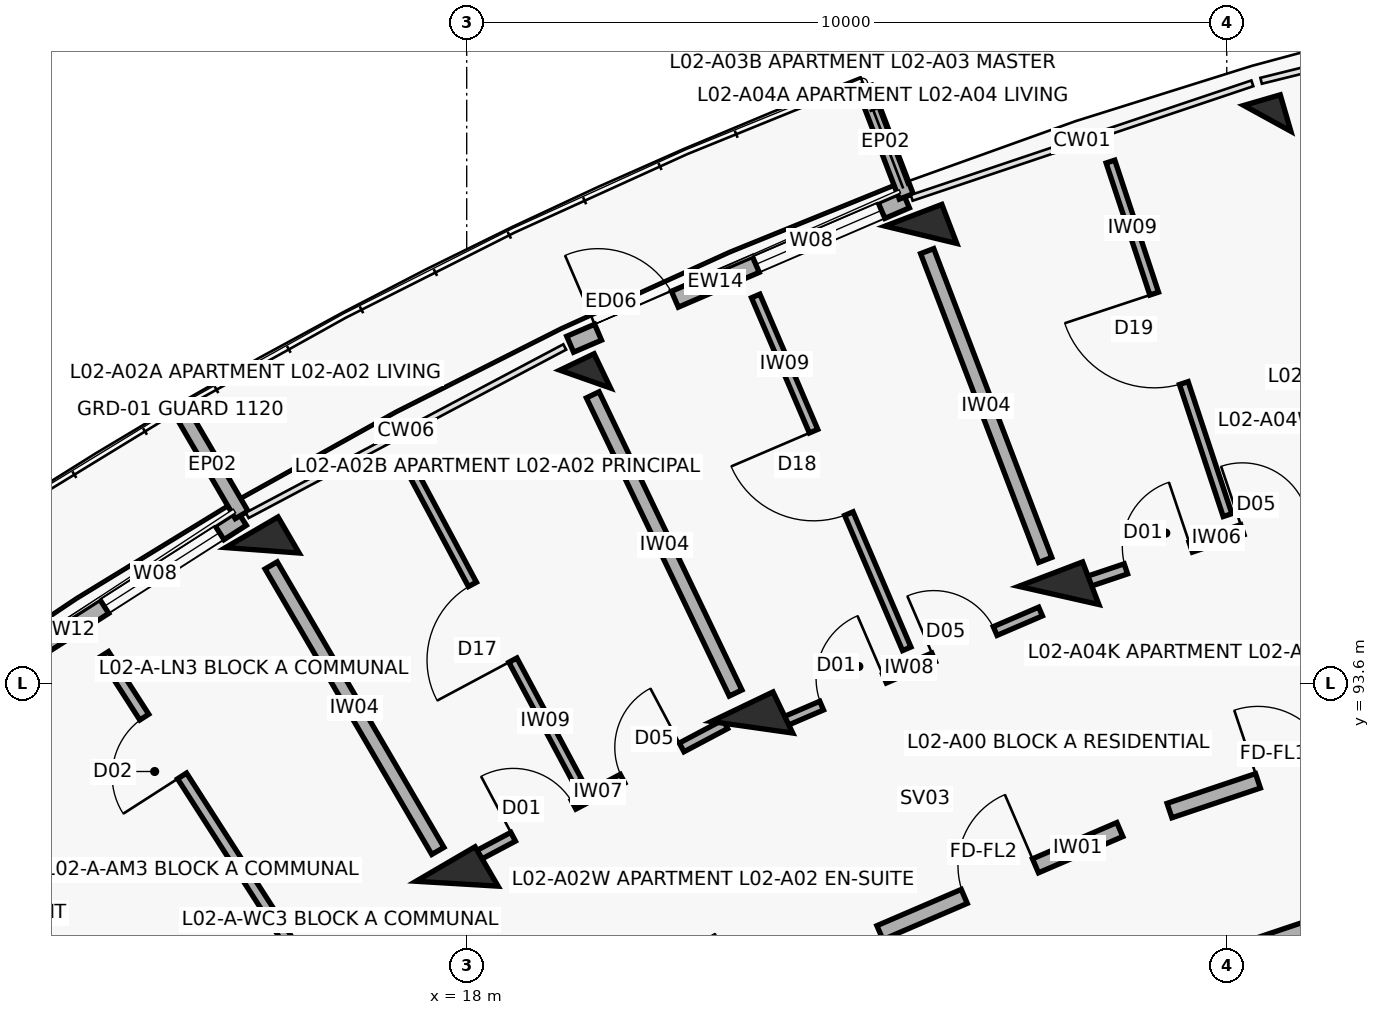
"""IFC4 building model, lengths in metres.
Left out: names, types, materials, properties, quantities, classifications, styles, units other than length and angle.
Written with IfcOpenShell. Run it as: python <this file> out.ifc"""

import sys

from ifc_helpers import new_model, si_unit, direction, frame, frame_2d, origin, origin_2d, place, context, subcontext, project, spatial, rectangle, extrude, element, fill, save


model = new_model("IFC4")
c1 = context("Model", 3, precision=1e-05, world=origin(), true_north=direction((0.0, 1.0)))
c2 = subcontext(c1, "Body", "Model", "MODEL_VIEW")
j1 = project(units=[si_unit("LENGTHUNIT", "METRE"), si_unit("PLANEANGLEUNIT", "RADIAN")], contexts=[c1])
p1 = place(None, origin())
s1 = spatial("IfcSite", under=j1, at=p1, CompositionType="ELEMENT")
p2 = place(p1, origin())
s2 = spatial("IfcBuilding", under=s1, at=p2, CompositionType="ELEMENT")
p3 = place(p2, frame((0.0, 0.0, 8.1)))
s3 = spatial("IfcBuildingStorey", under=s2, at=p3, CompositionType="ELEMENT", Elevation=8.1)
p4 = place(p3, frame((17.873, 90.96, 0.0), z_axis=(0.0, 0.0, 1.0), x_axis=(-0.504226211181, 0.863571611366, 0.0)))
e1 = element("IfcColumn", 1, at=p4, inside=s3, PredefinedType="COLUMN", context=c2, shape_type="SweptSolid", body=[
    extrude(rectangle(XDim=0.6, YDim=0.9, at=origin_2d()), origin(), (0.0, 0.0, 1.0), 3.1),
])
p5 = place(p3, frame((15.311, 95.347, 0.0), z_axis=(0.0, 0.0, 1.0), x_axis=(-0.504226211181, 0.863571611366, 0.0)))
e2 = element("IfcColumn", 2, at=p5, inside=s3, PredefinedType="COLUMN", context=c2, shape_type="SweptSolid", body=[
    extrude(rectangle(XDim=0.55, YDim=0.8, at=origin_2d()), origin(), (0.0, 0.0, 1.0), 3.1),
])
p6 = place(p3, frame((21.754, 93.019, 0.0), z_axis=(0.0, 0.0, 1.0), x_axis=(-0.432085748802, 0.901832526405, 0.0)))
e3 = element("IfcColumn", 3, at=p6, inside=s3, PredefinedType="COLUMN", context=c2, shape_type="SweptSolid", body=[
    extrude(rectangle(XDim=0.6, YDim=0.9, at=origin_2d()), origin(), (0.0, 0.0, 1.0), 3.1),
])
p7 = place(p3, frame((19.559, 97.6, 0.0), z_axis=(0.0, 0.0, 1.0), x_axis=(-0.432085748802, 0.901832526405, 0.0)))
e4 = element("IfcColumn", 4, at=p7, inside=s3, PredefinedType="COLUMN", context=c2, shape_type="SweptSolid", body=[
    extrude(rectangle(XDim=0.5, YDim=0.5, at=origin_2d()), origin(), (0.0, 0.0, 1.0), 3.1),
])
p8 = place(p3, frame((25.79, 94.753, 0.0), z_axis=(0.0, 0.0, 1.0), x_axis=(-0.357064076459, 0.934079892355, 0.0)))
e5 = element("IfcColumn", 5, at=p8, inside=s3, PredefinedType="COLUMN", context=c2, shape_type="SweptSolid", body=[
    extrude(rectangle(XDim=0.6, YDim=0.9, at=origin_2d()), origin(), (0.0, 0.0, 1.0), 3.1),
])
p9 = place(p3, frame((23.976, 99.499, 0.0), z_axis=(0.0, 0.0, 1.0), x_axis=(-0.357064076459, 0.934079892355, 0.0)))
e6 = element("IfcColumn", 6, at=p9, inside=s3, PredefinedType="COLUMN", context=c2, shape_type="SweptSolid", body=[
    extrude(rectangle(XDim=0.55, YDim=0.8, at=origin_2d()), origin(), (0.0, 0.0, 1.0), 3.1),
])
p10 = place(p3, frame((28.533, 101.031, 0.0), z_axis=(0.0, 0.0, 1.0), x_axis=(-0.27966144946, 0.96009867914, 0.0)))
e7 = element("IfcColumn", 7, at=p10, inside=s3, PredefinedType="COLUMN", context=c2, shape_type="SweptSolid", body=[
    extrude(rectangle(XDim=0.5, YDim=0.5, at=origin_2d()), origin(), (0.0, 0.0, 1.0), 3.1),
])
p11 = place(p3, frame((10.992, 93.176, 0.0), z_axis=(0.0, 0.0, 1.0), x_axis=(0.84226218024, 0.539068103061, 0.0)))
e8 = element("IfcWall", 8, at=p11, inside=s3, PredefinedType="SOLIDWALL", context=c2, shape_type="SweptSolid", body=[
    extrude(rectangle(XDim=4.809, YDim=0.218, at=frame_2d((2.404, 0.0))), origin(), (0.0, 0.0, 1.0), 2.25),
])
p12 = place(p11, frame((0.4, 0.0, 0.0)))
e9 = element("IfcOpeningElement", 9, at=p12, cuts=e8, PredefinedType="OPENING", context=c2, shape_type="SweptSolid", body=[
    extrude(rectangle(XDim=1.1, YDim=2.15, at=frame_2d((0.55, 1.075))), frame((0.0, 0.119, 0.0), z_axis=(0.0, -1.0, 0.0), x_axis=(1.0, 0.0, 0.0)), (0.0, 0.0, 1.0), 0.238),
])
p13 = place(p11, frame((2.659, 0.0, 0.35)))
e10 = element("IfcOpeningElement", 10, at=p13, cuts=e8, PredefinedType="OPENING", context=c2, shape_type="SweptSolid", body=[
    extrude(rectangle(XDim=1.8, YDim=1.65, at=frame_2d((0.9, 0.825))), frame((0.0, 0.119, 0.0), z_axis=(0.0, -1.0, 0.0), x_axis=(1.0, 0.0, 0.0)), (0.0, 0.0, 1.0), 0.238),
])
p14 = place(p3, frame((15.039, 95.813, 0.0), z_axis=(0.0, 0.0, 1.0), x_axis=(-0.504228145431, 0.863570481985, 0.0)))
e11 = element("IfcWall", 11, at=p14, inside=s3, PredefinedType="PARAPET", context=c2, shape_type="SweptSolid", body=[
    extrude(rectangle(XDim=1.53, YDim=0.195, at=frame_2d((0.765, 0.0))), origin(), (0.0, 0.0, 1.0), 2.25),
])
p15 = place(p3, frame((19.361, 98.059, 0.0), z_axis=(0.0, 0.0, 1.0), x_axis=(0.918711189033, 0.394930058548, 0.0)))
e12 = element("IfcWall", 12, at=p15, inside=s3, PredefinedType="SOLIDWALL", context=c2, shape_type="SweptSolid", body=[
    extrude(rectangle(XDim=4.809, YDim=0.228, at=frame_2d((2.404, 0.0))), origin(), (0.0, 0.0, 1.0), 2.25),
])
p16 = place(p15, frame((0.4, 0.0, 0.0)))
e13 = element("IfcOpeningElement", 13, at=p16, cuts=e12, PredefinedType="OPENING", context=c2, shape_type="SweptSolid", body=[
    extrude(rectangle(XDim=1.1, YDim=2.15, at=frame_2d((0.55, 1.075))), frame((0.0, 0.124, 0.0), z_axis=(0.0, -1.0, 0.0), x_axis=(1.0, 0.0, 0.0)), (0.0, 0.0, 1.0), 0.248),
])
p17 = place(p15, frame((2.659, 0.0, 0.35)))
e14 = element("IfcOpeningElement", 14, at=p17, cuts=e12, PredefinedType="OPENING", context=c2, shape_type="SweptSolid", body=[
    extrude(rectangle(XDim=1.8, YDim=1.65, at=frame_2d((0.9, 0.825))), frame((0.0, 0.124, 0.0), z_axis=(0.0, -1.0, 0.0), x_axis=(1.0, 0.0, 0.0)), (0.0, 0.0, 1.0), 0.248),
])
p18 = place(p3, frame((23.783, 100.003, 0.0), z_axis=(0.0, 0.0, 1.0), x_axis=(-0.356957296461, 0.934120703391, 0.0)))
e15 = element("IfcWall", 15, at=p18, inside=s3, PredefinedType="PARAPET", context=c2, shape_type="SweptSolid", body=[
    extrude(rectangle(XDim=1.53, YDim=0.195, at=frame_2d((0.765, 0.0))), origin(), (0.0, 0.0, 1.0), 2.25),
])
p19 = place(p3, frame((17.524, 87.288, 0.0), z_axis=(0.0, 0.0, 1.0), x_axis=(-0.540338452216, 0.841447774408, 0.0)))
e16 = element("IfcWall", 16, at=p19, inside=s3, PredefinedType="PARTITIONING", context=c2, shape_type="SweptSolid", body=[
    extrude(rectangle(XDim=7.95, YDim=0.14, at=frame_2d((3.975, 0.0))), origin(), (0.0, 0.0, 1.0), 2.08),
])
p20 = place(p19, frame((6.05, 0.0, 0.0)))
e17 = element("IfcOpeningElement", 17, at=p20, cuts=e16, PredefinedType="OPENING", context=c2, shape_type="SweptSolid", body=[
    extrude(rectangle(XDim=0.92, YDim=2.1, at=frame_2d((0.46, 1.05))), frame((0.0, 0.08, 0.0), z_axis=(0.0, -1.0, 0.0), x_axis=(1.0, 0.0, 0.0)), (0.0, 0.0, 1.0), 0.16),
])
p21 = place(p3, frame((18.037, 91.273, 0.0), z_axis=(0.0, 0.0, 1.0), x_axis=(0.883441603894, 0.468541281543, 0.0)))
e18 = element("IfcWall", 18, at=p21, inside=s3, PredefinedType="PARTITIONING", context=c2, shape_type="SweptSolid", body=[
    extrude(rectangle(XDim=3.81, YDim=0.13, at=frame_2d((1.905, 0.0))), origin(), (0.0, 0.0, 1.0), 2.08),
])
p22 = place(p21, frame((0.65, 0.0, 0.0)))
e19 = element("IfcOpeningElement", 19, at=p22, cuts=e18, PredefinedType="OPENING", context=c2, shape_type="SweptSolid", body=[
    extrude(rectangle(XDim=0.9, YDim=2.1, at=frame_2d((0.45, 1.05))), frame((0.0, 0.075, 0.0), z_axis=(0.0, -1.0, 0.0), x_axis=(1.0, 0.0, 0.0)), (0.0, 0.0, 1.0), 0.15),
])
p23 = place(p21, frame((2.28, 0.0, 0.0)))
e20 = element("IfcOpeningElement", 20, at=p23, cuts=e18, PredefinedType="OPENING", context=c2, shape_type="SweptSolid", body=[
    extrude(rectangle(XDim=0.88, YDim=2.1, at=frame_2d((0.44, 1.05))), frame((0.0, 0.075, 0.0), z_axis=(0.0, -1.0, 0.0), x_axis=(1.0, 0.0, 0.0)), (0.0, 0.0, 1.0), 0.15),
])
p24 = place(p3, frame((19.46, 92.306, 0.0), z_axis=(0.0, 0.0, 1.0), x_axis=(-0.471228378949, 0.88201123285, 0.0)))
e21 = element("IfcWall", 21, at=p24, inside=s3, PredefinedType="PARTITIONING", context=c2, shape_type="SweptSolid", body=[
    extrude(rectangle(XDim=4.75, YDim=0.12, at=frame_2d((2.375, 0.0))), origin(), (0.0, 0.0, 1.0), 2.08),
])
p25 = place(p24, frame((1.81, 0.0, 0.0)))
e22 = element("IfcOpeningElement", 22, at=p25, cuts=e21, PredefinedType="OPENING", context=c2, shape_type="SweptSolid", body=[
    extrude(rectangle(XDim=1.13, YDim=2.1, at=frame_2d((0.565, 1.05))), frame((0.0, 0.07, 0.0), z_axis=(0.0, -1.0, 0.0), x_axis=(1.0, 0.0, 0.0)), (0.0, 0.0, 1.0), 0.14),
])
p26 = place(p3, frame((17.621, 91.392, 0.0), z_axis=(0.0, 0.0, 1.0), x_axis=(-0.504216452091, 0.863577309475, 0.0)))
e23 = element("IfcWall", 23, at=p26, inside=s3, PredefinedType="SOLIDWALL", context=c2, shape_type="SweptSolid", body=[
    extrude(rectangle(XDim=4.35, YDim=0.185, at=frame_2d((2.175, 0.0))), origin(), (0.0, 0.0, 1.0), 2.08),
])
p27 = place(p3, frame((23.437, 90.316, 0.0), z_axis=(0.0, 0.0, 1.0), x_axis=(0.918718172399, 0.394913813008, 0.0)))
e24 = element("IfcWall", 24, at=p27, inside=s3, PredefinedType="SOLIDWALL", context=c2, shape_type="SweptSolid", body=[
    extrude(rectangle(XDim=3.436, YDim=0.2, at=frame_2d((1.718, 0.0))), origin(), (0.0, 0.0, 1.0), 2.08),
])
p28 = place(p27, frame((1.208, 0.0, 0.0)))
e25 = element("IfcOpeningElement", 25, at=p28, cuts=e24, PredefinedType="OPENING", context=c2, shape_type="SweptSolid", body=[
    extrude(rectangle(XDim=1.02, YDim=2.15, at=frame_2d((0.51, 1.075))), frame((0.0, 0.11, 0.0), z_axis=(0.0, -1.0, 0.0), x_axis=(1.0, 0.0, 0.0)), (0.0, 0.0, 1.0), 0.22),
])
p29 = place(p3, frame((22.073, 93.047, 0.0), z_axis=(0.0, 0.0, 1.0), x_axis=(0.918737522346, 0.394868794707, 0.0)))
e26 = element("IfcWall", 26, at=p29, inside=s3, PredefinedType="PARTITIONING", context=c2, shape_type="SweptSolid", body=[
    extrude(rectangle(XDim=3.785, YDim=0.125, at=frame_2d((1.893, 0.0))), origin(), (0.0, 0.0, 1.0), 2.08),
])
p30 = place(p29, frame((0.65, 0.0, 0.0)))
e27 = element("IfcOpeningElement", 27, at=p30, cuts=e26, PredefinedType="OPENING", context=c2, shape_type="SweptSolid", body=[
    extrude(rectangle(XDim=0.9, YDim=2.1, at=frame_2d((0.45, 1.05))), frame((0.0, 0.073, 0.0), z_axis=(0.0, -1.0, 0.0), x_axis=(1.0, 0.0, 0.0)), (0.0, 0.0, 1.0), 0.145),
])
p31 = place(p29, frame((2.255, 0.0, 0.0)))
e28 = element("IfcOpeningElement", 28, at=p31, cuts=e26, PredefinedType="OPENING", context=c2, shape_type="SweptSolid", body=[
    extrude(rectangle(XDim=0.88, YDim=2.1, at=frame_2d((0.44, 1.05))), frame((0.0, 0.073, 0.0), z_axis=(0.0, -1.0, 0.0), x_axis=(1.0, 0.0, 0.0)), (0.0, 0.0, 1.0), 0.145),
])
p32 = place(p3, frame((23.789, 94.051, 0.0), z_axis=(0.0, 0.0, 1.0), x_axis=(-0.393539995583, 0.919307495823, 0.0)))
e29 = element("IfcWall", 29, at=p32, inside=s3, PredefinedType="PARTITIONING", context=c2, shape_type="SweptSolid", body=[
    extrude(rectangle(XDim=5.05, YDim=0.12, at=frame_2d((2.525, 0.0))), origin(), (0.0, 0.0, 1.0), 2.08),
])
p33 = place(p32, frame((1.935, 0.0, 0.0)))
e30 = element("IfcOpeningElement", 30, at=p33, cuts=e29, PredefinedType="OPENING", context=c2, shape_type="SweptSolid", body=[
    extrude(rectangle(XDim=1.18, YDim=2.1, at=frame_2d((0.59, 1.05))), frame((0.0, 0.07, 0.0), z_axis=(0.0, -1.0, 0.0), x_axis=(1.0, 0.0, 0.0)), (0.0, 0.0, 1.0), 0.14),
])
p34 = place(p3, frame((21.538, 93.469, 0.0), z_axis=(0.0, 0.0, 1.0), x_axis=(-0.432086898897, 0.901831975371, 0.0)))
e31 = element("IfcWall", 31, at=p34, inside=s3, PredefinedType="SOLIDWALL", context=c2, shape_type="SweptSolid", body=[
    extrude(rectangle(XDim=4.35, YDim=0.185, at=frame_2d((2.175, 0.0))), origin(), (0.0, 0.0, 1.0), 2.08),
])
p35 = place(p3, frame((27.247, 91.923, 0.0), z_axis=(0.0, 0.0, 1.0), x_axis=(0.947863007629, 0.318678080151, 0.0)))
e32 = element("IfcWall", 32, at=p35, inside=s3, PredefinedType="SOLIDWALL", context=c2, shape_type="SweptSolid", body=[
    extrude(rectangle(XDim=3.436, YDim=0.2, at=frame_2d((1.718, 0.0))), origin(), (0.0, 0.0, 1.0), 2.08),
])
p36 = place(p35, frame((1.228, 0.0, 0.0)))
e33 = element("IfcOpeningElement", 33, at=p36, cuts=e32, PredefinedType="OPENING", context=c2, shape_type="SweptSolid", body=[
    extrude(rectangle(XDim=0.98, YDim=2.15, at=frame_2d((0.49, 1.075))), frame((0.0, 0.11, 0.0), z_axis=(0.0, -1.0, 0.0), x_axis=(1.0, 0.0, 0.0)), (0.0, 0.0, 1.0), 0.22),
])
p37 = place(p3, frame((27.979, 90.008, 0.0), z_axis=(0.0, 0.0, 1.0), x_axis=(0.94787351033, 0.318646839643, 0.0)))
e34 = element("IfcWall", 34, at=p37, inside=s3, PredefinedType="SOLIDWALL", context=c2, shape_type="SweptSolid", body=[
    extrude(rectangle(XDim=3.269, YDim=0.19, at=frame_2d((1.634, 0.0))), origin(), (0.0, 0.0, 1.0), 2.08),
])
p38 = place(p37, frame((1.184, 0.0, 0.0)))
e35 = element("IfcOpeningElement", 35, at=p38, cuts=e34, PredefinedType="OPENING", context=c2, shape_type="SweptSolid", body=[
    extrude(rectangle(XDim=0.9, YDim=2.1, at=frame_2d((0.45, 1.05))), frame((0.0, 0.105, 0.0), z_axis=(0.0, -1.0, 0.0), x_axis=(1.0, 0.0, 0.0)), (0.0, 0.0, 1.0), 0.21),
])
p39 = place(p3, frame((26.056, 94.896, 0.0), z_axis=(0.0, 0.0, 1.0), x_axis=(0.947876567739, 0.318637744673, 0.0)))
e36 = element("IfcWall", 36, at=p39, inside=s3, PredefinedType="PARTITIONING", context=c2, shape_type="SweptSolid", body=[
    extrude(rectangle(XDim=3.797, YDim=0.14, at=frame_2d((1.899, 0.0))), origin(), (0.0, 0.0, 1.0), 2.08),
])
p40 = place(p39, frame((0.65, 0.0, 0.0)))
e37 = element("IfcOpeningElement", 37, at=p40, cuts=e36, PredefinedType="OPENING", context=c2, shape_type="SweptSolid", body=[
    extrude(rectangle(XDim=0.9, YDim=2.1, at=frame_2d((0.45, 1.05))), frame((0.0, 0.08, 0.0), z_axis=(0.0, -1.0, 0.0), x_axis=(1.0, 0.0, 0.0)), (0.0, 0.0, 1.0), 0.16),
])
p41 = place(p39, frame((2.267, 0.0, 0.0)))
e38 = element("IfcOpeningElement", 38, at=p41, cuts=e36, PredefinedType="OPENING", context=c2, shape_type="SweptSolid", body=[
    extrude(rectangle(XDim=0.88, YDim=2.1, at=frame_2d((0.44, 1.05))), frame((0.0, 0.08, 0.0), z_axis=(0.0, -1.0, 0.0), x_axis=(1.0, 0.0, 0.0)), (0.0, 0.0, 1.0), 0.16),
])
p42 = place(p3, frame((28.01, 95.81, 0.0), z_axis=(0.0, 0.0, 1.0), x_axis=(-0.314343770763, 0.949309219266, 0.0)))
e39 = element("IfcWall", 39, at=p42, inside=s3, PredefinedType="PARTITIONING", context=c2, shape_type="SweptSolid", body=[
    extrude(rectangle(XDim=4.9, YDim=0.12, at=frame_2d((2.45, 0.0))), origin(), (0.0, 0.0, 1.0), 2.08),
])
p43 = place(p42, frame((1.83, 0.0, 0.0)))
e40 = element("IfcOpeningElement", 40, at=p43, cuts=e39, PredefinedType="OPENING", context=c2, shape_type="SweptSolid", body=[
    extrude(rectangle(XDim=1.24, YDim=2.1, at=frame_2d((0.62, 1.05))), frame((0.0, 0.07, 0.0), z_axis=(0.0, -1.0, 0.0), x_axis=(1.0, 0.0, 0.0)), (0.0, 0.0, 1.0), 0.14),
])
p44 = place(p3, frame((25.611, 95.22, 0.0), z_axis=(0.0, 0.0, 1.0), x_axis=(-0.357064016205, 0.934079915388, 0.0)))
e41 = element("IfcWall", 41, at=p44, inside=s3, PredefinedType="SOLIDWALL", context=c2, shape_type="SweptSolid", body=[
    extrude(rectangle(XDim=4.35, YDim=0.185, at=frame_2d((2.175, 0.0))), origin(), (0.0, 0.0, 1.0), 2.08),
])
p45 = place(p13, origin())
e42 = element("IfcWindow", 42, at=p45, inside=s3, PartitioningType="TRIPLE_PANEL_VERTICAL", PredefinedType="WINDOW", context=c2, shape_type="SweptSolid", body=[
    extrude(rectangle(XDim=1.8, YDim=1.65, at=frame_2d((0.9, 0.825))), frame((0.0, 0.03, 0.0), z_axis=(0.0, -1.0, 0.0), x_axis=(1.0, 0.0, 0.0)), (0.0, 0.0, 1.0), 0.06),
])
fill(e10, e42)
p46 = place(p16, origin())
e43 = element("IfcDoor", 43, at=p46, inside=s3, OperationType="SINGLE_SWING_LEFT", PredefinedType="DOOR", context=c2, shape_type="SweptSolid", body=[
    extrude(rectangle(XDim=1.1, YDim=2.15, at=frame_2d((0.55, 1.075))), frame((0.0, 0.025, 0.0), z_axis=(0.0, -1.0, 0.0), x_axis=(1.0, 0.0, 0.0)), (0.0, 0.0, 1.0), 0.05),
])
fill(e13, e43)
p47 = place(p17, origin())
e44 = element("IfcWindow", 44, at=p47, inside=s3, PartitioningType="TRIPLE_PANEL_VERTICAL", PredefinedType="WINDOW", context=c2, shape_type="SweptSolid", body=[
    extrude(rectangle(XDim=1.8, YDim=1.65, at=frame_2d((0.9, 0.825))), frame((0.0, 0.03, 0.0), z_axis=(0.0, -1.0, 0.0), x_axis=(1.0, 0.0, 0.0)), (0.0, 0.0, 1.0), 0.06),
])
fill(e14, e44)
p48 = place(p20, origin())
e45 = element("IfcDoor", 45, at=p48, inside=s3, OperationType="SINGLE_SWING_LEFT", PredefinedType="DOOR", context=c2, shape_type="SweptSolid", body=[
    extrude(rectangle(XDim=0.92, YDim=2.1, at=frame_2d((0.46, 1.05))), frame((0.0, 0.025, 0.0), z_axis=(0.0, -1.0, 0.0), x_axis=(1.0, 0.0, 0.0)), (0.0, 0.0, 1.0), 0.05),
])
fill(e17, e45)
p49 = place(p22, origin())
e46 = element("IfcDoor", 46, at=p49, inside=s3, OperationType="SINGLE_SWING_LEFT", PredefinedType="DOOR", context=c2, shape_type="SweptSolid", body=[
    extrude(rectangle(XDim=0.9, YDim=2.1, at=frame_2d((0.45, 1.05))), frame((0.0, 0.025, 0.0), z_axis=(0.0, -1.0, 0.0), x_axis=(1.0, 0.0, 0.0)), (0.0, 0.0, 1.0), 0.05),
])
fill(e19, e46)
p50 = place(p23, origin())
e47 = element("IfcDoor", 47, at=p50, inside=s3, OperationType="SINGLE_SWING_RIGHT", PredefinedType="DOOR", context=c2, shape_type="SweptSolid", body=[
    extrude(rectangle(XDim=0.88, YDim=2.1, at=frame_2d((0.44, 1.05))), frame((0.0, 0.025, 0.0), z_axis=(0.0, -1.0, 0.0), x_axis=(1.0, 0.0, 0.0)), (0.0, 0.0, 1.0), 0.05),
])
fill(e20, e47)
p51 = place(p25, origin())
e48 = element("IfcDoor", 48, at=p51, inside=s3, OperationType="SINGLE_SWING_LEFT", PredefinedType="DOOR", context=c2, shape_type="SweptSolid", body=[
    extrude(rectangle(XDim=1.13, YDim=2.1, at=frame_2d((0.565, 1.05))), frame((0.0, 0.025, 0.0), z_axis=(0.0, -1.0, 0.0), x_axis=(1.0, 0.0, 0.0)), (0.0, 0.0, 1.0), 0.05),
])
fill(e22, e48)
p52 = place(p28, origin())
e49 = element("IfcDoor", 49, at=p52, inside=s3, OperationType="SINGLE_SWING_RIGHT", PredefinedType="DOOR", context=c2, shape_type="SweptSolid", body=[
    extrude(rectangle(XDim=1.02, YDim=2.15, at=frame_2d((0.51, 1.075))), frame((0.0, 0.025, 0.0), z_axis=(0.0, -1.0, 0.0), x_axis=(1.0, 0.0, 0.0)), (0.0, 0.0, 1.0), 0.05),
])
fill(e25, e49)
p53 = place(p30, origin())
e50 = element("IfcDoor", 50, at=p53, inside=s3, OperationType="SINGLE_SWING_RIGHT", PredefinedType="DOOR", context=c2, shape_type="SweptSolid", body=[
    extrude(rectangle(XDim=0.9, YDim=2.1, at=frame_2d((0.45, 1.05))), frame((0.0, 0.025, 0.0), z_axis=(0.0, -1.0, 0.0), x_axis=(1.0, 0.0, 0.0)), (0.0, 0.0, 1.0), 0.05),
])
fill(e27, e50)
p54 = place(p31, origin())
e51 = element("IfcDoor", 51, at=p54, inside=s3, OperationType="SINGLE_SWING_LEFT", PredefinedType="DOOR", context=c2, shape_type="SweptSolid", body=[
    extrude(rectangle(XDim=0.88, YDim=2.1, at=frame_2d((0.44, 1.05))), frame((0.0, 0.025, 0.0), z_axis=(0.0, -1.0, 0.0), x_axis=(1.0, 0.0, 0.0)), (0.0, 0.0, 1.0), 0.05),
])
fill(e28, e51)
p55 = place(p33, origin())
e52 = element("IfcDoor", 52, at=p55, inside=s3, OperationType="SINGLE_SWING_RIGHT", PredefinedType="DOOR", context=c2, shape_type="SweptSolid", body=[
    extrude(rectangle(XDim=1.18, YDim=2.1, at=frame_2d((0.59, 1.05))), frame((0.0, 0.025, 0.0), z_axis=(0.0, -1.0, 0.0), x_axis=(1.0, 0.0, 0.0)), (0.0, 0.0, 1.0), 0.05),
])
fill(e30, e52)
p56 = place(p36, origin())
e53 = element("IfcDoor", 53, at=p56, inside=s3, OperationType="SINGLE_SWING_LEFT", PredefinedType="DOOR", context=c2, shape_type="SweptSolid", body=[
    extrude(rectangle(XDim=0.98, YDim=2.15, at=frame_2d((0.49, 1.075))), frame((0.0, 0.025, 0.0), z_axis=(0.0, -1.0, 0.0), x_axis=(1.0, 0.0, 0.0)), (0.0, 0.0, 1.0), 0.05),
])
fill(e33, e53)
p57 = place(p40, origin())
e54 = element("IfcDoor", 54, at=p57, inside=s3, OperationType="SINGLE_SWING_RIGHT", PredefinedType="DOOR", context=c2, shape_type="SweptSolid", body=[
    extrude(rectangle(XDim=0.9, YDim=2.1, at=frame_2d((0.45, 1.05))), frame((0.0, 0.025, 0.0), z_axis=(0.0, -1.0, 0.0), x_axis=(1.0, 0.0, 0.0)), (0.0, 0.0, 1.0), 0.05),
])
fill(e37, e54)
p58 = place(p41, origin())
e55 = element("IfcDoor", 55, at=p58, inside=s3, OperationType="SINGLE_SWING_LEFT", PredefinedType="DOOR", context=c2, shape_type="SweptSolid", body=[
    extrude(rectangle(XDim=0.88, YDim=2.1, at=frame_2d((0.44, 1.05))), frame((0.0, 0.025, 0.0), z_axis=(0.0, -1.0, 0.0), x_axis=(1.0, 0.0, 0.0)), (0.0, 0.0, 1.0), 0.05),
])
fill(e38, e55)
p59 = place(p43, origin())
e56 = element("IfcDoor", 56, at=p59, inside=s3, OperationType="SINGLE_SWING_RIGHT", PredefinedType="DOOR", context=c2, shape_type="SweptSolid", body=[
    extrude(rectangle(XDim=1.24, YDim=2.1, at=frame_2d((0.62, 1.05))), frame((0.0, 0.025, 0.0), z_axis=(0.0, -1.0, 0.0), x_axis=(1.0, 0.0, 0.0)), (0.0, 0.0, 1.0), 0.05),
])
fill(e40, e56)
save(model, sys.argv[1])
